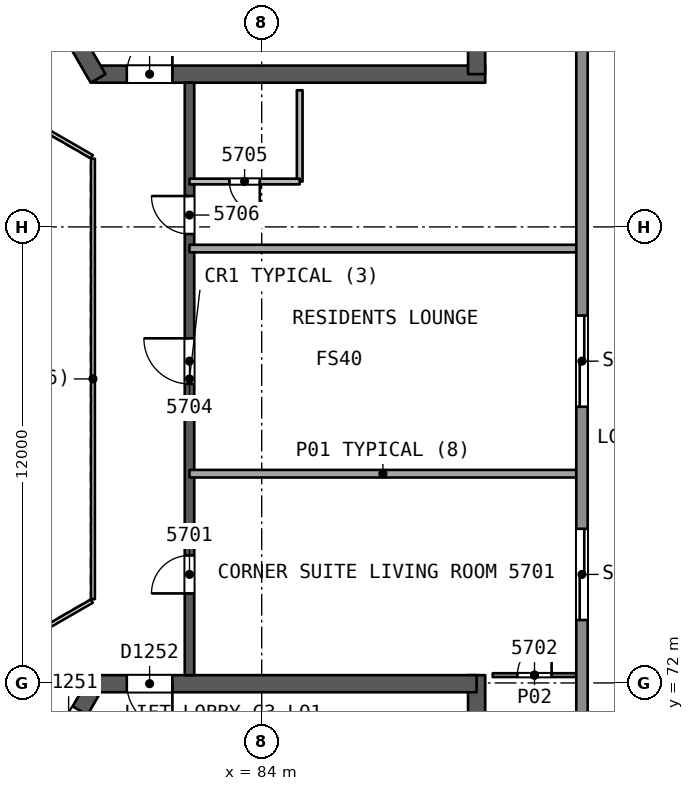
"""IFC4 building model, lengths in metres.
Left out: names, types, materials, properties, quantities, classifications, styles, units other than length and angle.
Written with IfcOpenShell. Run it as: python <this file> out.ifc"""

import sys

from ifc_helpers import new_model, si_unit, direction, frame, frame_2d, origin, place, context, subcontext, project, spatial, rectangle, extrude, element, fill, save


model = new_model("IFC4")
c1 = context("Model", 3, precision=1e-05, world=origin(), true_north=direction((0.0, 1.0)))
c2 = subcontext(c1, "Body", "Model", "MODEL_VIEW")
j1 = project(units=[si_unit("LENGTHUNIT", "METRE"), si_unit("PLANEANGLEUNIT", "RADIAN")], contexts=[c1])
p1 = place(None, origin())
s1 = spatial("IfcSite", under=j1, at=p1, CompositionType="ELEMENT")
p2 = place(p1, origin())
s2 = spatial("IfcBuilding", under=s1, at=p2, CompositionType="ELEMENT")
p3 = place(p2, frame((0.0, 0.0, 231.7)))
s3 = spatial("IfcBuildingStorey", under=s2, at=p3, CompositionType="ELEMENT", Elevation=231.7)
p4 = place(p3, frame((79.63, 88.019, 0.0), z_axis=(0.0, 0.0, 1.0), x_axis=(1.0, 0.0, 0.0)))
e1 = element("IfcWall", 1, at=p4, inside=s3, PredefinedType="SHEAR", context=c2, shape_type="SweptSolid", body=[
    extrude(rectangle(XDim=10.25, YDim=0.45, at=frame_2d((5.125, 0.0))), origin(), (0.0, 0.0, 1.0), 3.7),
])
p5 = place(p4, frame((0.82, 0.0, 0.0)))
e2 = element("IfcOpeningElement", 2, at=p5, cuts=e1, PredefinedType="OPENING", context=c2, shape_type="SweptSolid", body=[
    extrude(rectangle(XDim=1.2, YDim=2.1, at=frame_2d((0.6, 1.05))), frame((0.0, 0.235, 0.0), z_axis=(0.0, -1.0, 0.0), x_axis=(1.0, 0.0, 0.0)), (0.0, 0.0, 1.0), 0.471),
])
p6 = place(p3, frame((89.655, 88.019, 0.0), z_axis=(0.0, 0.0, 1.0), x_axis=(0.0, 1.0, 0.0)))
e3 = element("IfcWall", 3, at=p6, inside=s3, PredefinedType="SHEAR", context=c2, shape_type="SweptSolid", body=[
    extrude(rectangle(XDim=14.108, YDim=0.45, at=frame_2d((7.054, 0.0))), origin(), (0.0, 0.0, 1.0), 3.7),
])
p7 = place(p3, frame((74.617, 96.701, 0.0), z_axis=(0.0, 0.0, 1.0), x_axis=(0.499994385119, -0.866028645513, 0.0)))
e4 = element("IfcWall", 4, at=p7, inside=s3, PredefinedType="SHEAR", context=c2, shape_type="SweptSolid", body=[
    extrude(rectangle(XDim=10.155, YDim=0.45, at=frame_2d((5.077, 0.0))), origin(), (0.0, 0.0, 1.0), 3.7),
])
p8 = place(p7, frame((8.005, 0.0, 0.0)))
e5 = element("IfcOpeningElement", 5, at=p8, cuts=e4, PredefinedType="OPENING", context=c2, shape_type="SweptSolid", body=[
    extrude(rectangle(XDim=1.2, YDim=2.1, at=frame_2d((0.6, 1.05))), frame((0.0, 0.235, 0.0), z_axis=(0.0, -1.0, 0.0), x_axis=(1.0, 0.0, 0.0)), (0.0, 0.0, 1.0), 0.471),
])
p9 = place(p3, frame((79.63, 71.981, 0.0), z_axis=(0.0, 0.0, 1.0), x_axis=(-0.500002171595, -0.86602415001, 0.0)))
e6 = element("IfcWall", 6, at=p9, inside=s3, PredefinedType="SHEAR", context=c2, shape_type="SweptSolid", body=[
    extrude(rectangle(XDim=10.25, YDim=0.45, at=frame_2d((5.125, 0.0))), origin(), (0.0, 0.0, 1.0), 3.7),
])
p10 = place(p9, frame((0.82, 0.0, 0.0)))
e7 = element("IfcOpeningElement", 7, at=p10, cuts=e6, PredefinedType="OPENING", context=c2, shape_type="SweptSolid", body=[
    extrude(rectangle(XDim=1.2, YDim=2.1, at=frame_2d((0.6, 1.05))), frame((0.0, 0.235, 0.0), z_axis=(0.0, -1.0, 0.0), x_axis=(1.0, 0.0, 0.0)), (0.0, 0.0, 1.0), 0.471),
])
p11 = place(p3, frame((89.655, 58.002, 0.0), z_axis=(0.0, 0.0, 1.0), x_axis=(0.0, 1.0, 0.0)))
e8 = element("IfcWall", 8, at=p11, inside=s3, PredefinedType="SHEAR", context=c2, shape_type="SweptSolid", body=[
    extrude(rectangle(XDim=14.204, YDim=0.45, at=frame_2d((7.102, 0.0))), origin(), (0.0, 0.0, 1.0), 3.7),
])
p12 = place(p3, frame((89.655, 71.981, 0.0), z_axis=(0.0, 0.0, 1.0), x_axis=(-1.0, 0.0, 0.0)))
e9 = element("IfcWall", 9, at=p12, inside=s3, PredefinedType="SHEAR", context=c2, shape_type="SweptSolid", body=[
    extrude(rectangle(XDim=10.155, YDim=0.45, at=frame_2d((5.078, 0.0))), origin(), (0.0, 0.0, 1.0), 3.7),
])
p13 = place(p12, frame((8.005, 0.0, 0.0)))
e10 = element("IfcOpeningElement", 10, at=p13, cuts=e9, PredefinedType="OPENING", context=c2, shape_type="SweptSolid", body=[
    extrude(rectangle(XDim=1.2, YDim=2.1, at=frame_2d((0.6, 1.05))), frame((0.0, 0.235, 0.0), z_axis=(0.0, -1.0, 0.0), x_axis=(1.0, 0.0, 0.0)), (0.0, 0.0, 1.0), 0.471),
])
p14 = place(p3, frame((82.1, 72.206, 0.0), z_axis=(0.0, 0.0, 1.0), x_axis=(0.0, 1.0, 0.0)))
e11 = element("IfcWall", 11, at=p14, inside=s3, PredefinedType="SHEAR", context=c2, shape_type="SweptSolid", body=[
    extrude(rectangle(XDim=15.588, YDim=0.25, at=frame_2d((7.794, 0.0))), origin(), (0.0, 0.0, 1.0), 3.3),
])
p15 = place(p14, frame((2.15, 0.0, 0.0)))
e12 = element("IfcOpeningElement", 12, at=p15, cuts=e11, PredefinedType="OPENING", context=c2, shape_type="SweptSolid", body=[
    extrude(rectangle(XDim=1.0, YDim=2.1, at=frame_2d((0.5, 1.05))), frame((0.0, 0.135, 0.0), z_axis=(0.0, -1.0, 0.0), x_axis=(1.0, 0.0, 0.0)), (0.0, 0.0, 1.0), 0.271),
])
p16 = place(p14, frame((7.662, 0.0, 0.0)))
e13 = element("IfcOpeningElement", 13, at=p16, cuts=e11, PredefinedType="OPENING", context=c2, shape_type="SweptSolid", body=[
    extrude(rectangle(XDim=1.2, YDim=2.4, at=frame_2d((0.6, 1.2))), frame((0.0, 0.135, 0.0), z_axis=(0.0, -1.0, 0.0), x_axis=(1.0, 0.0, 0.0)), (0.0, 0.0, 1.0), 0.271),
])
p17 = place(p14, frame((11.606, 0.0, 0.0)))
e14 = element("IfcOpeningElement", 14, at=p17, cuts=e11, PredefinedType="OPENING", context=c2, shape_type="SweptSolid", body=[
    extrude(rectangle(XDim=1.0, YDim=2.1, at=frame_2d((0.5, 1.05))), frame((0.0, 0.135, 0.0), z_axis=(0.0, -1.0, 0.0), x_axis=(1.0, 0.0, 0.0)), (0.0, 0.0, 1.0), 0.271),
])
p18 = place(p3, frame((90.079, 72.206, 0.0), z_axis=(0.0, 0.0, 1.0), x_axis=(1.0, 0.0, 0.0)))
e15 = element("IfcWall", 15, at=p18, inside=s3, PredefinedType="PARTITIONING", context=c2, shape_type="SweptSolid", body=[
    extrude(rectangle(XDim=2.2, YDim=0.1, at=frame_2d((1.1, 0.0))), origin(), (0.0, 0.0, 1.0), 3.3),
])
p19 = place(p18, frame((0.65, 0.0, 0.0)))
e16 = element("IfcOpeningElement", 16, at=p19, cuts=e15, PredefinedType="OPENING", context=c2, shape_type="SweptSolid", body=[
    extrude(rectangle(XDim=0.9, YDim=2.1, at=frame_2d((0.45, 1.05))), frame((0.0, 0.061, 0.0), z_axis=(0.0, -1.0, 0.0), x_axis=(1.0, 0.0, 0.0)), (0.0, 0.0, 1.0), 0.121),
])
for number, where, z_axis, x_axis in (
    (17, (92.279, 77.506, 0.0), (0.0, 0.0, 1.0), (-1.0, 0.0, 0.0)),
    (18, (92.279, 83.429, 0.0), (0.0, 0.0, 1.0), (-1.0, 0.0, 0.0)),
):
    element("IfcWall", number, at=place(p3, frame(where, z_axis=z_axis, x_axis=x_axis)), inside=s3, PredefinedType="PARTITIONING", context=c2, shape_type="SweptSolid", body=[
        extrude(rectangle(XDim=10.179, YDim=0.2, at=frame_2d((5.089, 0.0))), origin(), (0.0, 0.0, 1.0), 3.3),
    ])
p20 = place(p3, frame((85.0, 87.595, 0.0), z_axis=(0.0, 0.0, 1.0), x_axis=(0.0, -1.0, 0.0)))
e19 = element("IfcWall", 19, at=p20, inside=s3, PredefinedType="PARTITIONING", context=c2, shape_type="SweptSolid", body=[
    extrude(rectangle(XDim=2.401, YDim=0.15, at=frame_2d((1.2, 0.0))), origin(), (0.0, 0.0, 1.0), 3.3),
])
p21 = place(p3, frame((85.0, 85.194, 0.0), z_axis=(0.0, 0.0, 1.0), x_axis=(-1.0, 0.0, 0.0)))
e20 = element("IfcWall", 20, at=p21, inside=s3, PredefinedType="PARTITIONING", context=c2, shape_type="SweptSolid", body=[
    extrude(rectangle(XDim=2.9, YDim=0.15, at=frame_2d((1.45, 0.0))), origin(), (0.0, 0.0, 1.0), 3.3),
])
p22 = place(p21, frame((1.05, 0.0, 0.0)))
e21 = element("IfcOpeningElement", 21, at=p22, cuts=e20, PredefinedType="OPENING", context=c2, shape_type="SweptSolid", body=[
    extrude(rectangle(XDim=0.8, YDim=2.1, at=frame_2d((0.4, 1.05))), frame((0.0, 0.085, 0.0), z_axis=(0.0, -1.0, 0.0), x_axis=(1.0, 0.0, 0.0)), (0.0, 0.0, 1.0), 0.171),
])
p23 = place(p3, frame((92.428, 105.059, 0.0), z_axis=(0.0, 0.0, 1.0), x_axis=(0.0, -1.0, 0.0)))
e22 = element("IfcWall", 22, at=p23, inside=s3, PredefinedType="SOLIDWALL", context=c2, shape_type="SweptSolid", body=[
    extrude(rectangle(XDim=50.118, YDim=0.3, at=frame_2d((25.059, 0.0))), origin(), (0.0, 0.0, 1.0), 3.3),
])
p24 = place(p23, frame((29.003, 0.0, 0.0)))
e23 = element("IfcOpeningElement", 23, at=p24, cuts=e22, PredefinedType="OPENING", context=c2, shape_type="SweptSolid", body=[
    extrude(rectangle(XDim=2.4, YDim=2.4, at=frame_2d((1.2, 1.2))), frame((0.0, 0.161, 0.0), z_axis=(0.0, -1.0, 0.0), x_axis=(1.0, 0.0, 0.0)), (0.0, 0.0, 1.0), 0.321),
])
p25 = place(p23, frame((39.0, 0.0, 0.0)))
e24 = element("IfcOpeningElement", 24, at=p25, cuts=e22, PredefinedType="OPENING", context=c2, shape_type="SweptSolid", body=[
    extrude(rectangle(XDim=2.4, YDim=2.4, at=frame_2d((1.2, 1.2))), frame((0.0, 0.161, 0.0), z_axis=(0.0, -1.0, 0.0), x_axis=(1.0, 0.0, 0.0)), (0.0, 0.0, 1.0), 0.321),
])
p26 = place(p23, frame((9.572, 0.0, 0.0)))
e25 = element("IfcOpeningElement", 25, at=p26, cuts=e22, PredefinedType="OPENING", context=c2, shape_type="SweptSolid", body=[
    extrude(rectangle(XDim=2.4, YDim=2.4, at=frame_2d((1.2, 1.2))), frame((0.0, 0.161, 0.0), z_axis=(0.0, -1.0, 0.0), x_axis=(1.0, 0.0, 0.0)), (0.0, 0.0, 1.0), 0.321),
])
p27 = place(p23, frame((23.391, 0.0, 0.0)))
e26 = element("IfcOpeningElement", 26, at=p27, cuts=e22, PredefinedType="OPENING", context=c2, shape_type="SweptSolid", body=[
    extrude(rectangle(XDim=2.4, YDim=2.4, at=frame_2d((1.2, 1.2))), frame((0.0, 0.161, 0.0), z_axis=(0.0, -1.0, 0.0), x_axis=(1.0, 0.0, 0.0)), (0.0, 0.0, 1.0), 0.321),
])
p28 = place(p3, frame((44.584, 82.563, 0.0), z_axis=(0.0, 0.0, 1.0), x_axis=(0.866023992326, 0.500002444709, 0.0)))
e27 = element("IfcWall", 27, at=p28, inside=s3, PredefinedType="SOLIDWALL", context=c2, shape_type="SweptSolid", body=[
    extrude(rectangle(XDim=50.118, YDim=0.3, at=frame_2d((25.059, 0.0))), origin(), (0.0, 0.0, 1.0), 3.3),
])
p29 = place(p28, frame((23.391, 0.0, 0.0)))
e28 = element("IfcOpeningElement", 28, at=p29, cuts=e27, PredefinedType="OPENING", context=c2, shape_type="SweptSolid", body=[
    extrude(rectangle(XDim=2.4, YDim=2.4, at=frame_2d((1.2, 1.2))), frame((0.0, 0.161, 0.0), z_axis=(0.0, -1.0, 0.0), x_axis=(1.0, 0.0, 0.0)), (0.0, 0.0, 1.0), 0.321),
])
p30 = place(p28, frame((37.835, 0.0, 0.0)))
e29 = element("IfcOpeningElement", 29, at=p30, cuts=e27, PredefinedType="OPENING", context=c2, shape_type="SweptSolid", body=[
    extrude(rectangle(XDim=2.4, YDim=2.4, at=frame_2d((1.2, 1.2))), frame((0.0, 0.161, 0.0), z_axis=(0.0, -1.0, 0.0), x_axis=(1.0, 0.0, 0.0)), (0.0, 0.0, 1.0), 0.321),
])
p31 = place(p28, frame((9.416, 0.0, 0.0)))
e30 = element("IfcOpeningElement", 30, at=p31, cuts=e27, PredefinedType="OPENING", context=c2, shape_type="SweptSolid", body=[
    extrude(rectangle(XDim=2.4, YDim=2.4, at=frame_2d((1.2, 1.2))), frame((0.0, 0.161, 0.0), z_axis=(0.0, -1.0, 0.0), x_axis=(1.0, 0.0, 0.0)), (0.0, 0.0, 1.0), 0.321),
])
p32 = place(p3, frame((87.988, 52.377, 0.0), z_axis=(0.0, 0.0, 1.0), x_axis=(-0.866023992326, 0.500002444709, 0.0)))
e31 = element("IfcWall", 31, at=p32, inside=s3, PredefinedType="SOLIDWALL", context=c2, shape_type="SweptSolid", body=[
    extrude(rectangle(XDim=50.118, YDim=0.3, at=frame_2d((25.059, 0.0))), origin(), (0.0, 0.0, 1.0), 3.3),
])
p33 = place(p32, frame((24.015, 0.0, 0.0)))
e32 = element("IfcOpeningElement", 32, at=p33, cuts=e31, PredefinedType="OPENING", context=c2, shape_type="SweptSolid", body=[
    extrude(rectangle(XDim=2.4, YDim=2.4, at=frame_2d((1.2, 1.2))), frame((0.0, 0.161, 0.0), z_axis=(0.0, -1.0, 0.0), x_axis=(1.0, 0.0, 0.0)), (0.0, 0.0, 1.0), 0.321),
])
p34 = place(p32, frame((38.146, 0.0, 0.0)))
e33 = element("IfcOpeningElement", 33, at=p34, cuts=e31, PredefinedType="OPENING", context=c2, shape_type="SweptSolid", body=[
    extrude(rectangle(XDim=2.4, YDim=2.4, at=frame_2d((1.2, 1.2))), frame((0.0, 0.161, 0.0), z_axis=(0.0, -1.0, 0.0), x_axis=(1.0, 0.0, 0.0)), (0.0, 0.0, 1.0), 0.321),
])
p35 = place(p32, frame((9.727, 0.0, 0.0)))
e34 = element("IfcOpeningElement", 34, at=p35, cuts=e31, PredefinedType="OPENING", context=c2, shape_type="SweptSolid", body=[
    extrude(rectangle(XDim=2.4, YDim=2.4, at=frame_2d((1.2, 1.2))), frame((0.0, 0.161, 0.0), z_axis=(0.0, -1.0, 0.0), x_axis=(1.0, 0.0, 0.0)), (0.0, 0.0, 1.0), 0.321),
])
p36 = place(p3, frame((79.56, 74.206, 0.0), z_axis=(0.0, 0.0, 1.0), x_axis=(0.0, 1.0, 0.0)))
e35 = element("IfcWall", 35, at=p36, inside=s3, PredefinedType="PARTITIONING", context=c2, shape_type="SweptSolid", body=[
    extrude(rectangle(XDim=11.588, YDim=0.1, at=frame_2d((5.794, 0.0))), origin(), (0.0, 0.0, 1.0), 3.3),
])
for number, where, z_axis, x_axis in (
    (36, (79.53, 85.846, 0.0), (0.0, 0.0, 1.0), (-0.866, 0.5, 0.0)),
    (37, (77.798, 73.154, 0.0), (0.0, 0.0, 1.0), (0.866, 0.5, 0.0)),
):
    element("IfcWall", number, at=place(p3, frame(where, z_axis=z_axis, x_axis=x_axis)), inside=s3, PredefinedType="PARTITIONING", context=c2, shape_type="SweptSolid", body=[
        extrude(rectangle(XDim=2.0, YDim=0.1, at=frame_2d((1.0, 0.0))), origin(), (0.0, 0.0, 1.0), 3.3),
    ])
p37 = place(p15, origin())
e38 = element("IfcDoor", 38, at=p37, inside=s3, OperationType="SINGLE_SWING_LEFT", PredefinedType="NOTDEFINED", context=c2, shape_type="SweptSolid", body=[
    extrude(rectangle(XDim=1.0, YDim=2.1, at=frame_2d((0.5, 1.05))), frame((0.0, 0.025, 0.0), z_axis=(0.0, -1.0, 0.0), x_axis=(1.0, 0.0, 0.0)), (0.0, 0.0, 1.0), 0.05),
])
fill(e12, e38)
p38 = place(p19, origin())
e39 = element("IfcDoor", 39, at=p38, inside=s3, OperationType="SINGLE_SWING_RIGHT", PredefinedType="NOTDEFINED", context=c2, shape_type="SweptSolid", body=[
    extrude(rectangle(XDim=0.9, YDim=2.1, at=frame_2d((0.45, 1.05))), frame((0.0, 0.025, 0.0), z_axis=(0.0, -1.0, 0.0), x_axis=(1.0, 0.0, 0.0)), (0.0, 0.0, 1.0), 0.05),
])
fill(e16, e39)
p39 = place(p16, origin())
e40 = element("IfcDoor", 40, at=p39, inside=s3, OperationType="SINGLE_SWING_RIGHT", PredefinedType="NOTDEFINED", context=c2, shape_type="SweptSolid", body=[
    extrude(rectangle(XDim=1.2, YDim=2.4, at=frame_2d((0.6, 1.2))), frame((0.0, 0.025, 0.0), z_axis=(0.0, -1.0, 0.0), x_axis=(1.0, 0.0, 0.0)), (0.0, 0.0, 1.0), 0.05),
])
fill(e13, e40)
p40 = place(p22, origin())
e41 = element("IfcDoor", 41, at=p40, inside=s3, OperationType="SINGLE_SWING_LEFT", PredefinedType="NOTDEFINED", context=c2, shape_type="SweptSolid", body=[
    extrude(rectangle(XDim=0.8, YDim=2.1, at=frame_2d((0.4, 1.05))), frame((0.0, 0.025, 0.0), z_axis=(0.0, -1.0, 0.0), x_axis=(1.0, 0.0, 0.0)), (0.0, 0.0, 1.0), 0.05),
])
fill(e21, e41)
p41 = place(p17, origin())
e42 = element("IfcDoor", 42, at=p41, inside=s3, OperationType="SINGLE_SWING_RIGHT", PredefinedType="NOTDEFINED", context=c2, shape_type="SweptSolid", body=[
    extrude(rectangle(XDim=1.0, YDim=2.1, at=frame_2d((0.5, 1.05))), frame((0.0, 0.025, 0.0), z_axis=(0.0, -1.0, 0.0), x_axis=(1.0, 0.0, 0.0)), (0.0, 0.0, 1.0), 0.05),
])
fill(e14, e42)
p42 = place(p24, origin())
e43 = element("IfcDoor", 43, at=p42, inside=s3, OperationType="SLIDING_TO_LEFT", PredefinedType="NOTDEFINED", context=c2, shape_type="SweptSolid", body=[
    extrude(rectangle(XDim=2.4, YDim=2.4, at=frame_2d((1.2, 1.2))), frame((0.0, 0.025, 0.0), z_axis=(0.0, -1.0, 0.0), x_axis=(1.0, 0.0, 0.0)), (0.0, 0.0, 1.0), 0.05),
])
fill(e23, e43)
p43 = place(p27, origin())
e44 = element("IfcDoor", 44, at=p43, inside=s3, OperationType="SLIDING_TO_RIGHT", PredefinedType="NOTDEFINED", context=c2, shape_type="SweptSolid", body=[
    extrude(rectangle(XDim=2.4, YDim=2.4, at=frame_2d((1.2, 1.2))), frame((0.0, 0.025, 0.0), z_axis=(0.0, -1.0, 0.0), x_axis=(1.0, 0.0, 0.0)), (0.0, 0.0, 1.0), 0.05),
])
fill(e26, e44)
p44 = place(p5, origin())
e45 = element("IfcDoor", 45, at=p44, inside=s3, OperationType="SINGLE_SWING_RIGHT", PredefinedType="NOTDEFINED", context=c2, shape_type="SweptSolid", body=[
    extrude(rectangle(XDim=1.2, YDim=2.1, at=frame_2d((0.6, 1.05))), frame((0.0, 0.025, 0.0), z_axis=(0.0, -1.0, 0.0), x_axis=(1.0, 0.0, 0.0)), (0.0, 0.0, 1.0), 0.05),
])
fill(e2, e45)
p45 = place(p10, origin())
e46 = element("IfcDoor", 46, at=p45, inside=s3, OperationType="SINGLE_SWING_RIGHT", PredefinedType="NOTDEFINED", context=c2, shape_type="SweptSolid", body=[
    extrude(rectangle(XDim=1.2, YDim=2.1, at=frame_2d((0.6, 1.05))), frame((0.0, 0.025, 0.0), z_axis=(0.0, -1.0, 0.0), x_axis=(1.0, 0.0, 0.0)), (0.0, 0.0, 1.0), 0.05),
])
fill(e7, e46)
p46 = place(p13, origin())
e47 = element("IfcDoor", 47, at=p46, inside=s3, OperationType="SINGLE_SWING_LEFT", PredefinedType="NOTDEFINED", context=c2, shape_type="SweptSolid", body=[
    extrude(rectangle(XDim=1.2, YDim=2.1, at=frame_2d((0.6, 1.05))), frame((0.0, 0.025, 0.0), z_axis=(0.0, -1.0, 0.0), x_axis=(1.0, 0.0, 0.0)), (0.0, 0.0, 1.0), 0.05),
])
fill(e10, e47)
save(model, sys.argv[1])
